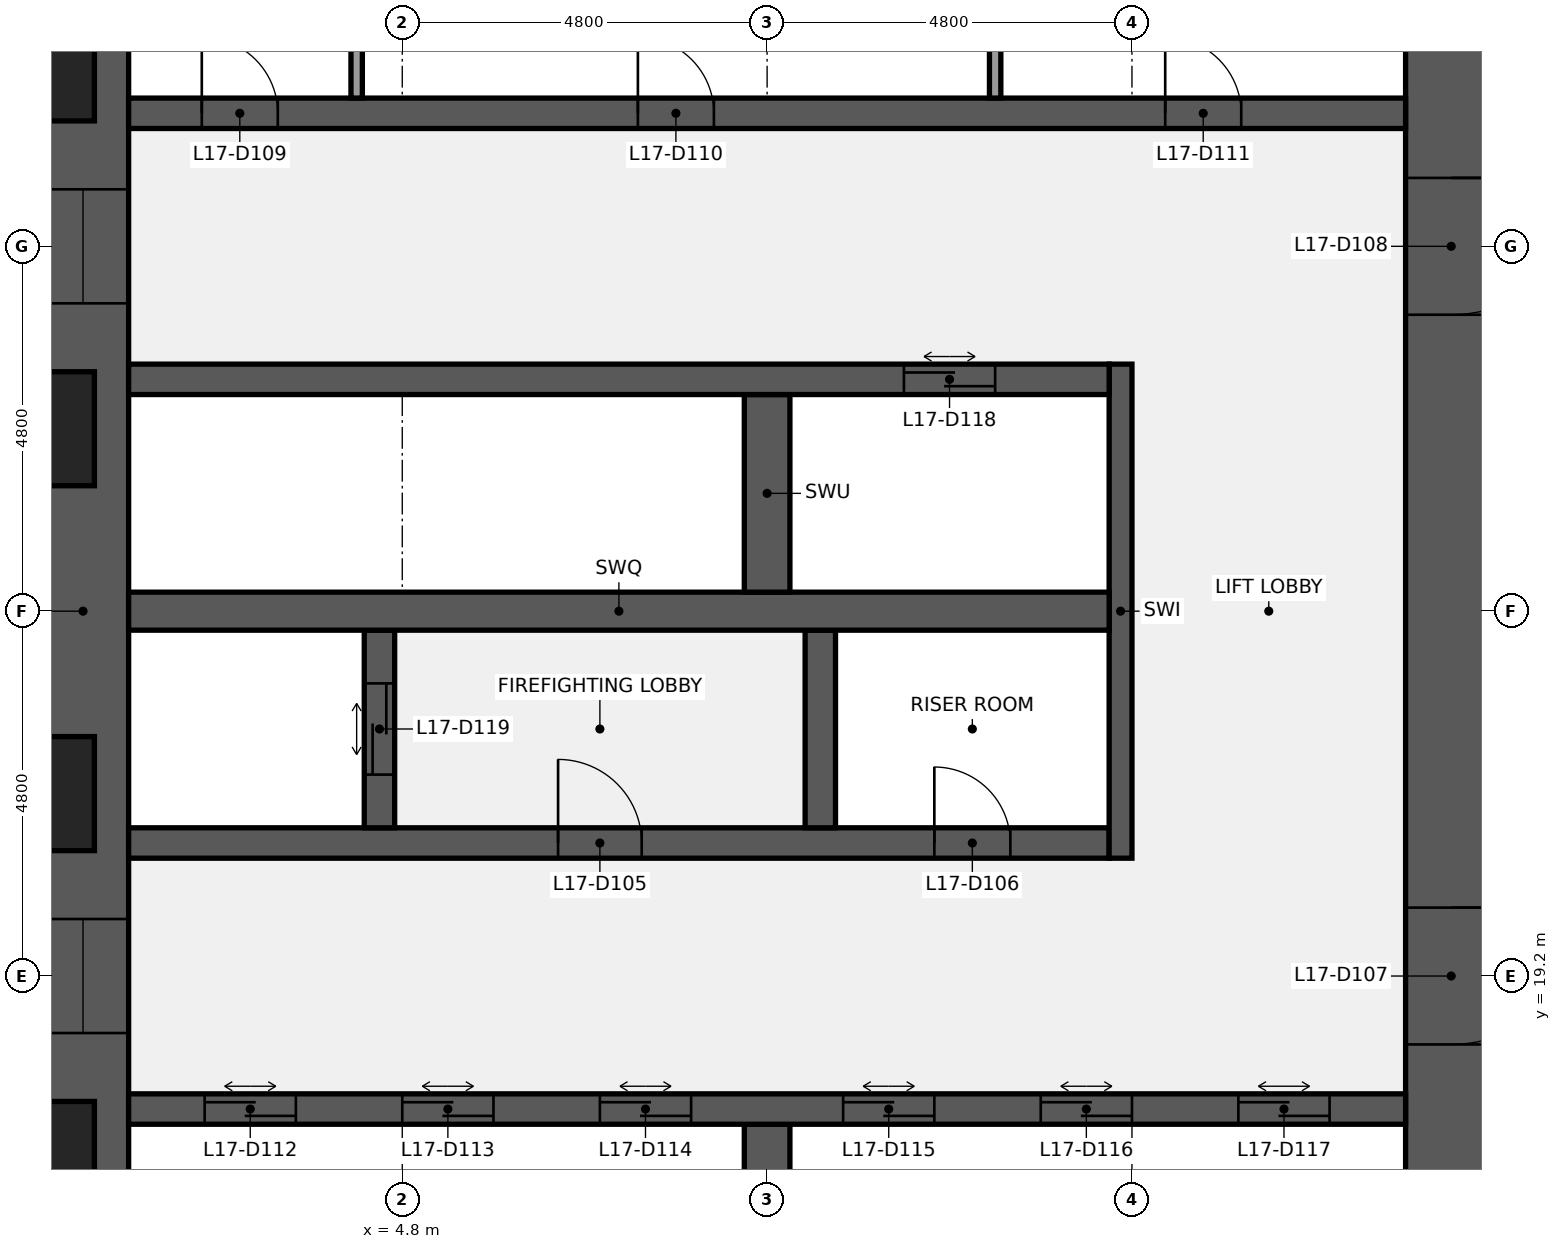
"""IFC4 building model, lengths in metres.
Left out: names, types, materials, properties, quantities, classifications, styles, units other than length and angle.
Written with IfcOpenShell. Run it as: python <this file> out.ifc"""

import sys

from ifc_helpers import new_model, si_unit, direction, frame, frame_2d, origin, place, context, subcontext, project, spatial, rectangle, extrude, element, fill, save


model = new_model("IFC4")
c1 = context("Model", 3, precision=1e-05, world=origin(), true_north=direction((0.0, 1.0)))
c2 = subcontext(c1, "Body", "Model", "MODEL_VIEW")
j1 = project(units=[si_unit("LENGTHUNIT", "METRE"), si_unit("PLANEANGLEUNIT", "RADIAN")], contexts=[c1])
p1 = place(None, origin())
s1 = spatial("IfcSite", under=j1, at=p1, CompositionType="ELEMENT")
p2 = place(p1, origin())
s2 = spatial("IfcBuilding", under=s1, at=p2, CompositionType="ELEMENT")
p3 = place(p2, frame((0.0, 0.0, 79.0)))
s3 = spatial("IfcBuildingStorey", under=s2, at=p3, CompositionType="ELEMENT", Elevation=79.0)
p4 = place(p3, frame((0.6, 9.6, 0.0), z_axis=(0.0, 0.0, 1.0), x_axis=(0.0, 1.0, 0.0)))
e1 = element("IfcWall", 1, at=p4, inside=s3, PredefinedType="SHEAR", context=c2, shape_type="SweptSolid", body=[
    extrude(rectangle(XDim=28.8, YDim=1.2, at=frame_2d((14.4, 0.0))), origin(), (0.0, 0.0, 1.0), 3.84),
])
p5 = place(p4, frame((8.85, 0.0, 0.9)))
e2 = element("IfcOpeningElement", 2, at=p5, cuts=e1, PredefinedType="OPENING", context=c2, shape_type="SweptSolid", body=[
    extrude(rectangle(XDim=1.5, YDim=1.5, at=frame_2d((0.75, 0.75))), frame((0.0, 0.61, 0.0), z_axis=(0.0, -1.0, 0.0), x_axis=(1.0, 0.0, 0.0)), (0.0, 0.0, 1.0), 1.22),
])
p6 = place(p4, frame((18.45, 0.0, 0.9)))
e3 = element("IfcOpeningElement", 3, at=p6, cuts=e1, PredefinedType="OPENING", context=c2, shape_type="SweptSolid", body=[
    extrude(rectangle(XDim=1.5, YDim=1.5, at=frame_2d((0.75, 0.75))), frame((0.0, 0.61, 0.0), z_axis=(0.0, -1.0, 0.0), x_axis=(1.0, 0.0, 0.0)), (0.0, 0.0, 1.0), 1.22),
])
p7 = place(p3, frame((18.6, 38.4, 0.0), z_axis=(0.0, 0.0, 1.0), x_axis=(0.0, -1.0, 0.0)))
e4 = element("IfcWall", 4, at=p7, inside=s3, PredefinedType="SHEAR", context=c2, shape_type="SweptSolid", body=[
    extrude(rectangle(XDim=28.8, YDim=1.2, at=frame_2d((14.4, 0.0))), origin(), (0.0, 0.0, 1.0), 3.84),
])
p8 = place(p7, frame((18.3, 0.0, 0.0)))
e5 = element("IfcOpeningElement", 5, at=p8, cuts=e4, PredefinedType="OPENING", context=c2, shape_type="SweptSolid", body=[
    extrude(rectangle(XDim=1.8, YDim=2.1, at=frame_2d((0.9, 1.05))), frame((0.0, 0.61, 0.0), z_axis=(0.0, -1.0, 0.0), x_axis=(1.0, 0.0, 0.0)), (0.0, 0.0, 1.0), 1.22),
])
p9 = place(p7, frame((8.7, 0.0, 0.0)))
e6 = element("IfcOpeningElement", 6, at=p9, cuts=e4, PredefinedType="OPENING", context=c2, shape_type="SweptSolid", body=[
    extrude(rectangle(XDim=1.8, YDim=2.1, at=frame_2d((0.9, 1.05))), frame((0.0, 0.61, 0.0), z_axis=(0.0, -1.0, 0.0), x_axis=(1.0, 0.0, 0.0)), (0.0, 0.0, 1.0), 1.22),
])
p10 = place(p3, frame((9.6, 14.65, 0.0), z_axis=(0.0, 0.0, 1.0), x_axis=(0.0, 1.0, 0.0)))
e7 = element("IfcWall", 7, at=p10, inside=s3, PredefinedType="SHEAR", context=c2, shape_type="SweptSolid", body=[
    extrude(rectangle(XDim=2.6, YDim=0.6, at=frame_2d((1.3, 0.0))), origin(), (0.0, 0.0, 1.0), 3.84),
])
p11 = place(p3, frame((1.2, 17.45, 0.0), z_axis=(0.0, 0.0, 1.0), x_axis=(1.0, 0.0, 0.0)))
e8 = element("IfcWall", 8, at=p11, inside=s3, PredefinedType="SHEAR", context=c2, shape_type="SweptSolid", body=[
    extrude(rectangle(XDim=16.8, YDim=0.4, at=frame_2d((8.4, 0.0))), origin(), (0.0, 0.0, 1.0), 3.84),
])
p12 = place(p11, frame((1.0, 0.0, 0.0)))
e9 = element("IfcOpeningElement", 9, at=p12, cuts=e8, PredefinedType="OPENING", context=c2, shape_type="SweptSolid", body=[
    extrude(rectangle(XDim=1.2, YDim=2.1, at=frame_2d((0.6, 1.05))), frame((0.0, 0.21, 0.0), z_axis=(0.0, -1.0, 0.0), x_axis=(1.0, 0.0, 0.0)), (0.0, 0.0, 1.0), 0.42),
])
p13 = place(p11, frame((3.6, 0.0, 0.0)))
e10 = element("IfcOpeningElement", 10, at=p13, cuts=e8, PredefinedType="OPENING", context=c2, shape_type="SweptSolid", body=[
    extrude(rectangle(XDim=1.2, YDim=2.1, at=frame_2d((0.6, 1.05))), frame((0.0, 0.21, 0.0), z_axis=(0.0, -1.0, 0.0), x_axis=(1.0, 0.0, 0.0)), (0.0, 0.0, 1.0), 0.42),
])
p14 = place(p11, frame((6.2, 0.0, 0.0)))
e11 = element("IfcOpeningElement", 11, at=p14, cuts=e8, PredefinedType="OPENING", context=c2, shape_type="SweptSolid", body=[
    extrude(rectangle(XDim=1.2, YDim=2.1, at=frame_2d((0.6, 1.05))), frame((0.0, 0.21, 0.0), z_axis=(0.0, -1.0, 0.0), x_axis=(1.0, 0.0, 0.0)), (0.0, 0.0, 1.0), 0.42),
])
p15 = place(p11, frame((9.4, 0.0, 0.0)))
e12 = element("IfcOpeningElement", 12, at=p15, cuts=e8, PredefinedType="OPENING", context=c2, shape_type="SweptSolid", body=[
    extrude(rectangle(XDim=1.2, YDim=2.1, at=frame_2d((0.6, 1.05))), frame((0.0, 0.21, 0.0), z_axis=(0.0, -1.0, 0.0), x_axis=(1.0, 0.0, 0.0)), (0.0, 0.0, 1.0), 0.42),
])
p16 = place(p11, frame((12.0, 0.0, 0.0)))
e13 = element("IfcOpeningElement", 13, at=p16, cuts=e8, PredefinedType="OPENING", context=c2, shape_type="SweptSolid", body=[
    extrude(rectangle(XDim=1.2, YDim=2.1, at=frame_2d((0.6, 1.05))), frame((0.0, 0.21, 0.0), z_axis=(0.0, -1.0, 0.0), x_axis=(1.0, 0.0, 0.0)), (0.0, 0.0, 1.0), 0.42),
])
p17 = place(p11, frame((14.6, 0.0, 0.0)))
e14 = element("IfcOpeningElement", 14, at=p17, cuts=e8, PredefinedType="OPENING", context=c2, shape_type="SweptSolid", body=[
    extrude(rectangle(XDim=1.2, YDim=2.1, at=frame_2d((0.6, 1.05))), frame((0.0, 0.21, 0.0), z_axis=(0.0, -1.0, 0.0), x_axis=(1.0, 0.0, 0.0)), (0.0, 0.0, 1.0), 0.42),
])
p18 = place(p3, frame((1.2, 20.95, 0.0), z_axis=(0.0, 0.0, 1.0), x_axis=(1.0, 0.0, 0.0)))
e15 = element("IfcWall", 15, at=p18, inside=s3, PredefinedType="SHEAR", context=c2, shape_type="SweptSolid", body=[
    extrude(rectangle(XDim=12.9, YDim=0.4, at=frame_2d((6.45, 0.0))), origin(), (0.0, 0.0, 1.0), 3.84),
])
p19 = place(p18, frame((5.65, 0.0, 0.0)))
e16 = element("IfcOpeningElement", 16, at=p19, cuts=e15, PredefinedType="OPENING", context=c2, shape_type="SweptSolid", body=[
    extrude(rectangle(XDim=1.1, YDim=2.1, at=frame_2d((0.55, 1.05))), frame((0.0, 0.21, 0.0), z_axis=(0.0, -1.0, 0.0), x_axis=(1.0, 0.0, 0.0)), (0.0, 0.0, 1.0), 0.42),
])
p20 = place(p18, frame((10.6, 0.0, 0.0)))
e17 = element("IfcOpeningElement", 17, at=p20, cuts=e15, PredefinedType="OPENING", context=c2, shape_type="SweptSolid", body=[
    extrude(rectangle(XDim=1.0, YDim=2.1, at=frame_2d((0.5, 1.05))), frame((0.0, 0.21, 0.0), z_axis=(0.0, -1.0, 0.0), x_axis=(1.0, 0.0, 0.0)), (0.0, 0.0, 1.0), 0.42),
])
p21 = place(p3, frame((14.25, 20.75, 0.0), z_axis=(0.0, 0.0, 1.0), x_axis=(0.0, 1.0, 0.0)))
e18 = element("IfcWall", 18, at=p21, inside=s3, PredefinedType="SHEAR", context=c2, shape_type="SweptSolid", body=[
    extrude(rectangle(XDim=6.5, YDim=0.3, at=frame_2d((3.25, 0.0))), origin(), (0.0, 0.0, 1.0), 3.84),
])
p22 = place(p3, frame((4.5, 21.15, 0.0), z_axis=(0.0, 0.0, 1.0), x_axis=(0.0, 1.0, 0.0)))
e19 = element("IfcWall", 19, at=p22, inside=s3, PredefinedType="SHEAR", context=c2, shape_type="SweptSolid", body=[
    extrude(rectangle(XDim=2.6, YDim=0.4, at=frame_2d((1.3, 0.0))), origin(), (0.0, 0.0, 1.0), 3.84),
])
p23 = place(p22, frame((0.7, 0.0, 0.0)))
e20 = element("IfcOpeningElement", 20, at=p23, cuts=e19, PredefinedType="OPENING", context=c2, shape_type="SweptSolid", body=[
    extrude(rectangle(XDim=1.2, YDim=2.1, at=frame_2d((0.6, 1.05))), frame((0.0, 0.21, 0.0), z_axis=(0.0, -1.0, 0.0), x_axis=(1.0, 0.0, 0.0)), (0.0, 0.0, 1.0), 0.42),
])
p24 = place(p3, frame((10.3, 21.15, 0.0), z_axis=(0.0, 0.0, 1.0), x_axis=(0.0, 1.0, 0.0)))
e21 = element("IfcWall", 21, at=p24, inside=s3, PredefinedType="SHEAR", context=c2, shape_type="SweptSolid", body=[
    extrude(rectangle(XDim=2.6, YDim=0.4, at=frame_2d((1.3, 0.0))), origin(), (0.0, 0.0, 1.0), 3.84),
])
p25 = place(p3, frame((1.2, 24.0, 0.0), z_axis=(0.0, 0.0, 1.0), x_axis=(1.0, 0.0, 0.0)))
e22 = element("IfcWall", 22, at=p25, inside=s3, PredefinedType="SHEAR", context=c2, shape_type="SweptSolid", body=[
    extrude(rectangle(XDim=12.9, YDim=0.5, at=frame_2d((6.45, 0.0))), origin(), (0.0, 0.0, 1.0), 3.84),
])
p26 = place(p3, frame((9.6, 24.25, 0.0), z_axis=(0.0, 0.0, 1.0), x_axis=(0.0, 1.0, 0.0)))
e23 = element("IfcWall", 23, at=p26, inside=s3, PredefinedType="SHEAR", context=c2, shape_type="SweptSolid", body=[
    extrude(rectangle(XDim=2.6, YDim=0.6, at=frame_2d((1.3, 0.0))), origin(), (0.0, 0.0, 1.0), 3.84),
])
p27 = place(p3, frame((1.2, 27.05, 0.0), z_axis=(0.0, 0.0, 1.0), x_axis=(1.0, 0.0, 0.0)))
e24 = element("IfcWall", 24, at=p27, inside=s3, PredefinedType="SHEAR", context=c2, shape_type="SweptSolid", body=[
    extrude(rectangle(XDim=12.9, YDim=0.4, at=frame_2d((6.45, 0.0))), origin(), (0.0, 0.0, 1.0), 3.84),
])
p28 = place(p27, frame((10.2, 0.0, 0.0)))
e25 = element("IfcOpeningElement", 25, at=p28, cuts=e24, PredefinedType="OPENING", context=c2, shape_type="SweptSolid", body=[
    extrude(rectangle(XDim=1.2, YDim=2.1, at=frame_2d((0.6, 1.05))), frame((0.0, 0.21, 0.0), z_axis=(0.0, -1.0, 0.0), x_axis=(1.0, 0.0, 0.0)), (0.0, 0.0, 1.0), 0.42),
])
p29 = place(p3, frame((1.2, 30.55, 0.0), z_axis=(0.0, 0.0, 1.0), x_axis=(1.0, 0.0, 0.0)))
e26 = element("IfcWall", 26, at=p29, inside=s3, PredefinedType="SHEAR", context=c2, shape_type="SweptSolid", body=[
    extrude(rectangle(XDim=16.8, YDim=0.4, at=frame_2d((8.4, 0.0))), origin(), (0.0, 0.0, 1.0), 3.84),
])
p30 = place(p29, frame((0.962, 0.0, 0.0)))
e27 = element("IfcOpeningElement", 27, at=p30, cuts=e26, PredefinedType="OPENING", context=c2, shape_type="SweptSolid", body=[
    extrude(rectangle(XDim=1.0, YDim=2.1, at=frame_2d((0.5, 1.05))), frame((0.0, 0.21, 0.0), z_axis=(0.0, -1.0, 0.0), x_axis=(1.0, 0.0, 0.0)), (0.0, 0.0, 1.0), 0.42),
])
p31 = place(p29, frame((6.7, 0.0, 0.0)))
e28 = element("IfcOpeningElement", 28, at=p31, cuts=e26, PredefinedType="OPENING", context=c2, shape_type="SweptSolid", body=[
    extrude(rectangle(XDim=1.0, YDim=2.1, at=frame_2d((0.5, 1.05))), frame((0.0, 0.21, 0.0), z_axis=(0.0, -1.0, 0.0), x_axis=(1.0, 0.0, 0.0)), (0.0, 0.0, 1.0), 0.42),
])
p32 = place(p29, frame((13.637, 0.0, 0.0)))
e29 = element("IfcOpeningElement", 29, at=p32, cuts=e26, PredefinedType="OPENING", context=c2, shape_type="SweptSolid", body=[
    extrude(rectangle(XDim=1.0, YDim=2.1, at=frame_2d((0.5, 1.05))), frame((0.0, 0.21, 0.0), z_axis=(0.0, -1.0, 0.0), x_axis=(1.0, 0.0, 0.0)), (0.0, 0.0, 1.0), 0.42),
])
for number, where, z_axis, x_axis in (
    (30, (4.2, 30.75, 0.0), (0.0, 0.0, 1.0), (0.0, 1.0, 0.0)),
    (31, (12.6, 30.75, 0.0), (0.0, 0.0, 1.0), (0.0, 1.0, 0.0)),
):
    element("IfcWall", number, at=place(p3, frame(where, z_axis=z_axis, x_axis=x_axis)), inside=s3, PredefinedType="PARTITIONING", context=c2, shape_type="SweptSolid", body=[
        extrude(rectangle(XDim=2.6, YDim=0.15, at=frame_2d((1.3, 0.0))), origin(), (0.0, 0.0, 1.0), 3.84),
    ])
p33 = place(p19, origin())
e32 = element("IfcDoor", 32, at=p33, inside=s3, OperationType="SINGLE_SWING_LEFT", PredefinedType="DOOR", context=c2, shape_type="SweptSolid", body=[
    extrude(rectangle(XDim=1.1, YDim=2.1, at=frame_2d((0.55, 1.05))), frame((0.0, 0.025, 0.0), z_axis=(0.0, -1.0, 0.0), x_axis=(1.0, 0.0, 0.0)), (0.0, 0.0, 1.0), 0.05),
])
fill(e16, e32)
p34 = place(p20, origin())
e33 = element("IfcDoor", 33, at=p34, inside=s3, OperationType="SINGLE_SWING_LEFT", PredefinedType="DOOR", context=c2, shape_type="SweptSolid", body=[
    extrude(rectangle(XDim=1.0, YDim=2.1, at=frame_2d((0.5, 1.05))), frame((0.0, 0.025, 0.0), z_axis=(0.0, -1.0, 0.0), x_axis=(1.0, 0.0, 0.0)), (0.0, 0.0, 1.0), 0.05),
])
fill(e17, e33)
p35 = place(p8, origin())
e34 = element("IfcDoor", 34, at=p35, inside=s3, OperationType="DOUBLE_DOOR_SINGLE_SWING", PredefinedType="DOOR", context=c2, shape_type="SweptSolid", body=[
    extrude(rectangle(XDim=1.8, YDim=2.1, at=frame_2d((0.9, 1.05))), frame((0.0, 0.025, 0.0), z_axis=(0.0, -1.0, 0.0), x_axis=(1.0, 0.0, 0.0)), (0.0, 0.0, 1.0), 0.05),
])
fill(e5, e34)
p36 = place(p9, origin())
e35 = element("IfcDoor", 35, at=p36, inside=s3, OperationType="DOUBLE_DOOR_SINGLE_SWING", PredefinedType="DOOR", context=c2, shape_type="SweptSolid", body=[
    extrude(rectangle(XDim=1.8, YDim=2.1, at=frame_2d((0.9, 1.05))), frame((0.0, 0.025, 0.0), z_axis=(0.0, -1.0, 0.0), x_axis=(1.0, 0.0, 0.0)), (0.0, 0.0, 1.0), 0.05),
])
fill(e6, e35)
p37 = place(p30, origin())
e36 = element("IfcDoor", 36, at=p37, inside=s3, OperationType="SINGLE_SWING_LEFT", PredefinedType="DOOR", context=c2, shape_type="SweptSolid", body=[
    extrude(rectangle(XDim=1.0, YDim=2.1, at=frame_2d((0.5, 1.05))), frame((0.0, 0.025, 0.0), z_axis=(0.0, -1.0, 0.0), x_axis=(1.0, 0.0, 0.0)), (0.0, 0.0, 1.0), 0.05),
])
fill(e27, e36)
p38 = place(p31, origin())
e37 = element("IfcDoor", 37, at=p38, inside=s3, OperationType="SINGLE_SWING_LEFT", PredefinedType="DOOR", context=c2, shape_type="SweptSolid", body=[
    extrude(rectangle(XDim=1.0, YDim=2.1, at=frame_2d((0.5, 1.05))), frame((0.0, 0.025, 0.0), z_axis=(0.0, -1.0, 0.0), x_axis=(1.0, 0.0, 0.0)), (0.0, 0.0, 1.0), 0.05),
])
fill(e28, e37)
p39 = place(p32, origin())
e38 = element("IfcDoor", 38, at=p39, inside=s3, OperationType="SINGLE_SWING_LEFT", PredefinedType="DOOR", context=c2, shape_type="SweptSolid", body=[
    extrude(rectangle(XDim=1.0, YDim=2.1, at=frame_2d((0.5, 1.05))), frame((0.0, 0.025, 0.0), z_axis=(0.0, -1.0, 0.0), x_axis=(1.0, 0.0, 0.0)), (0.0, 0.0, 1.0), 0.05),
])
fill(e29, e38)
p40 = place(p12, origin())
e39 = element("IfcDoor", 39, at=p40, inside=s3, OperationType="DOUBLE_DOOR_SLIDING", PredefinedType="DOOR", context=c2, shape_type="SweptSolid", body=[
    extrude(rectangle(XDim=1.2, YDim=2.1, at=frame_2d((0.6, 1.05))), frame((0.0, 0.025, 0.0), z_axis=(0.0, -1.0, 0.0), x_axis=(1.0, 0.0, 0.0)), (0.0, 0.0, 1.0), 0.05),
])
fill(e9, e39)
p41 = place(p13, origin())
e40 = element("IfcDoor", 40, at=p41, inside=s3, OperationType="DOUBLE_DOOR_SLIDING", PredefinedType="DOOR", context=c2, shape_type="SweptSolid", body=[
    extrude(rectangle(XDim=1.2, YDim=2.1, at=frame_2d((0.6, 1.05))), frame((0.0, 0.025, 0.0), z_axis=(0.0, -1.0, 0.0), x_axis=(1.0, 0.0, 0.0)), (0.0, 0.0, 1.0), 0.05),
])
fill(e10, e40)
p42 = place(p14, origin())
e41 = element("IfcDoor", 41, at=p42, inside=s3, OperationType="DOUBLE_DOOR_SLIDING", PredefinedType="DOOR", context=c2, shape_type="SweptSolid", body=[
    extrude(rectangle(XDim=1.2, YDim=2.1, at=frame_2d((0.6, 1.05))), frame((0.0, 0.025, 0.0), z_axis=(0.0, -1.0, 0.0), x_axis=(1.0, 0.0, 0.0)), (0.0, 0.0, 1.0), 0.05),
])
fill(e11, e41)
p43 = place(p15, origin())
e42 = element("IfcDoor", 42, at=p43, inside=s3, OperationType="DOUBLE_DOOR_SLIDING", PredefinedType="DOOR", context=c2, shape_type="SweptSolid", body=[
    extrude(rectangle(XDim=1.2, YDim=2.1, at=frame_2d((0.6, 1.05))), frame((0.0, 0.025, 0.0), z_axis=(0.0, -1.0, 0.0), x_axis=(1.0, 0.0, 0.0)), (0.0, 0.0, 1.0), 0.05),
])
fill(e12, e42)
p44 = place(p16, origin())
e43 = element("IfcDoor", 43, at=p44, inside=s3, OperationType="DOUBLE_DOOR_SLIDING", PredefinedType="DOOR", context=c2, shape_type="SweptSolid", body=[
    extrude(rectangle(XDim=1.2, YDim=2.1, at=frame_2d((0.6, 1.05))), frame((0.0, 0.025, 0.0), z_axis=(0.0, -1.0, 0.0), x_axis=(1.0, 0.0, 0.0)), (0.0, 0.0, 1.0), 0.05),
])
fill(e13, e43)
p45 = place(p17, origin())
e44 = element("IfcDoor", 44, at=p45, inside=s3, OperationType="DOUBLE_DOOR_SLIDING", PredefinedType="DOOR", context=c2, shape_type="SweptSolid", body=[
    extrude(rectangle(XDim=1.2, YDim=2.1, at=frame_2d((0.6, 1.05))), frame((0.0, 0.025, 0.0), z_axis=(0.0, -1.0, 0.0), x_axis=(1.0, 0.0, 0.0)), (0.0, 0.0, 1.0), 0.05),
])
fill(e14, e44)
p46 = place(p28, origin())
e45 = element("IfcDoor", 45, at=p46, inside=s3, OperationType="DOUBLE_DOOR_SLIDING", PredefinedType="DOOR", context=c2, shape_type="SweptSolid", body=[
    extrude(rectangle(XDim=1.2, YDim=2.1, at=frame_2d((0.6, 1.05))), frame((0.0, 0.025, 0.0), z_axis=(0.0, -1.0, 0.0), x_axis=(1.0, 0.0, 0.0)), (0.0, 0.0, 1.0), 0.05),
])
fill(e25, e45)
p47 = place(p23, origin())
e46 = element("IfcDoor", 46, at=p47, inside=s3, OperationType="DOUBLE_DOOR_SLIDING", PredefinedType="DOOR", context=c2, shape_type="SweptSolid", body=[
    extrude(rectangle(XDim=1.2, YDim=2.1, at=frame_2d((0.6, 1.05))), frame((0.0, 0.025, 0.0), z_axis=(0.0, -1.0, 0.0), x_axis=(1.0, 0.0, 0.0)), (0.0, 0.0, 1.0), 0.05),
])
fill(e20, e46)
p48 = place(p5, origin())
e47 = element("IfcWindow", 47, at=p48, inside=s3, PartitioningType="SINGLE_PANEL", PredefinedType="WINDOW", context=c2, shape_type="SweptSolid", body=[
    extrude(rectangle(XDim=1.5, YDim=1.5, at=frame_2d((0.75, 0.75))), frame((0.0, 0.03, 0.0), z_axis=(0.0, -1.0, 0.0), x_axis=(1.0, 0.0, 0.0)), (0.0, 0.0, 1.0), 0.06),
])
fill(e2, e47)
p49 = place(p6, origin())
e48 = element("IfcWindow", 48, at=p49, inside=s3, PartitioningType="SINGLE_PANEL", PredefinedType="WINDOW", context=c2, shape_type="SweptSolid", body=[
    extrude(rectangle(XDim=1.5, YDim=1.5, at=frame_2d((0.75, 0.75))), frame((0.0, 0.03, 0.0), z_axis=(0.0, -1.0, 0.0), x_axis=(1.0, 0.0, 0.0)), (0.0, 0.0, 1.0), 0.06),
])
fill(e3, e48)
save(model, sys.argv[1])
